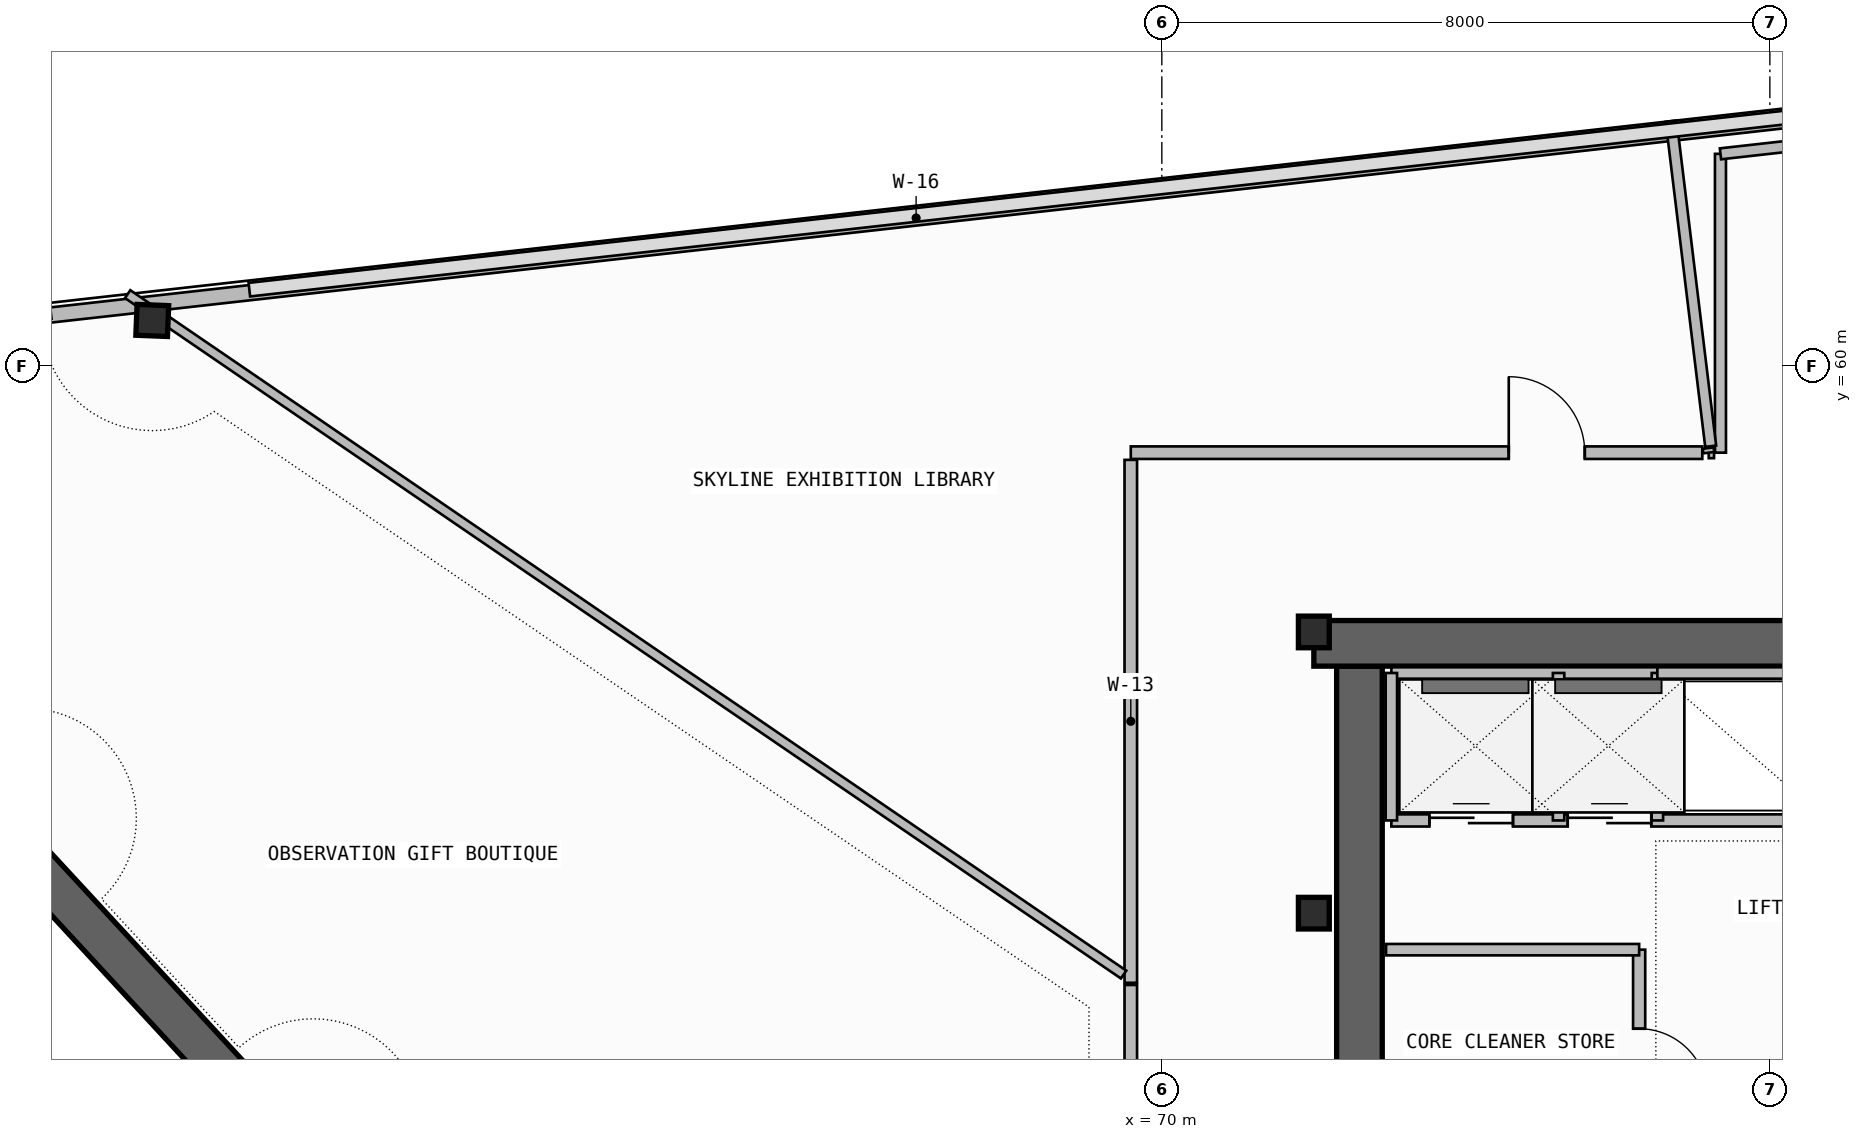
"""IFC4 building model, lengths in metres.
Left out: names, types, materials, properties, quantities, classifications, styles, units other than length and angle.
Written with IfcOpenShell. Run it as: python <this file> out.ifc"""

import sys

from ifc_helpers import new_model, si_unit, direction, frame, frame_2d, origin, origin_2d, place, context, subcontext, project, spatial, rectangle, i_section, extrude, element, fill, save


model = new_model("IFC4")
c1 = context("Model", 3, precision=1e-05, world=origin(), true_north=direction((0.0, 1.0)))
c2 = subcontext(c1, "Body", "Model", "MODEL_VIEW")
j1 = project(units=[si_unit("LENGTHUNIT", "METRE"), si_unit("PLANEANGLEUNIT", "RADIAN")], contexts=[c1])
p1 = place(None, origin())
s1 = spatial("IfcSite", under=j1, at=p1, CompositionType="ELEMENT")
p2 = place(p1, origin())
s2 = spatial("IfcBuilding", under=s1, at=p2, CompositionType="ELEMENT")
p3 = place(p2, frame((0.0, 0.0, 288.9)))
s3 = spatial("IfcBuildingStorey", under=s2, at=p3, CompositionType="ELEMENT", Elevation=288.9)
p4 = place(p3, frame((72.6, 43.35, -0.26), z_axis=(0.0, 0.0, 1.0), x_axis=(0.0, 1.0, 0.0)))
e1 = element("IfcWall", 1, at=p4, inside=s3, PredefinedType="SHEAR", context=c2, shape_type="SweptSolid", body=[
    extrude(rectangle(XDim=12.7, YDim=0.6, at=frame_2d((6.35, 0.0))), origin(), (0.0, 0.0, 1.0), 3.52),
])
p5 = place(p4, frame((1.35, 0.0, 0.26)))
e2 = element("IfcOpeningElement", 2, at=p5, cuts=e1, PredefinedType="OPENING", context=c2, shape_type="SweptSolid", body=[
    extrude(rectangle(XDim=1.2, YDim=2.2, at=frame_2d((0.6, 1.1))), frame((0.0, 0.31, 0.0), z_axis=(0.0, -1.0, 0.0), x_axis=(1.0, 0.0, 0.0)), (0.0, 0.0, 1.0), 0.62),
])
p6 = place(p3, frame((72.0, 56.35, -0.26), z_axis=(0.0, 0.0, 1.0), x_axis=(1.0, 0.0, 0.0)))
e3 = element("IfcWall", 3, at=p6, inside=s3, PredefinedType="SHEAR", context=c2, shape_type="SweptSolid", body=[
    extrude(rectangle(XDim=13.6, YDim=0.6, at=frame_2d((6.8, 0.0))), origin(), (0.0, 0.0, 1.0), 3.52),
])
for number, where, z_axis, x_axis in (
    (4, (72.0, 52.8, 0.0), (0.0, 0.0, 1.0), (1.0, 0.0, 0.0)),
    (5, (72.0, 56.5, 0.0), (0.0, 0.0, 1.0), (1.0, 0.0, 0.0)),
    (6, (56.717, 60.598, 0.0), (0.0, 0.0, 1.0), (0.039, 0.999, 0.0)),
):
    element("IfcColumn", number, at=place(p3, frame(where, z_axis=z_axis, x_axis=x_axis)), inside=s3, PredefinedType="COLUMN", context=c2, shape_type="SweptSolid", body=[
        extrude(i_section(OverallWidth=0.406, OverallDepth=0.416, WebThickness=0.03, FlangeThickness=0.048, FilletRadius=0.015, at=origin_2d()), origin(), (0.0, 0.0, 1.0), 3.52),
    ])
p7 = place(p3, frame((54.805, 53.812, -0.26), z_axis=(0.0, 0.0, 1.0), x_axis=(0.678803115619, -0.734320318543, 0.0)))
e7 = element("IfcWall", 7, at=p7, inside=s3, PredefinedType="SHEAR", context=c2, shape_type="SweptSolid", body=[
    extrude(rectangle(XDim=18.083, YDim=0.55, at=frame_2d((9.042, 0.0))), origin(), (0.0, 0.0, 1.0), 3.52),
])
p8 = place(p7, frame((7.434, 0.0, 1.1)))
e8 = element("IfcOpeningElement", 8, at=p8, cuts=e7, PredefinedType="OPENING", context=c2, shape_type="SweptSolid", body=[
    extrude(rectangle(XDim=2.4, YDim=1.2, at=frame_2d((1.2, 0.6))), frame((0.0, 0.285, 0.0), z_axis=(0.0, -1.0, 0.0), x_axis=(1.0, 0.0, 0.0)), (0.0, 0.0, 1.0), 0.57),
])
p9 = place(p3, frame((81.557, 63.604, 0.0), z_axis=(0.0, 0.0, 1.0), x_axis=(-0.993775831398, -0.111398370403, 0.0)))
e9 = element("IfcWall", 9, at=p9, inside=s3, PredefinedType="PARAPET", context=c2, shape_type="SweptSolid", body=[
    extrude(rectangle(XDim=29.764, YDim=0.2, at=frame_2d((14.882, 0.0))), origin(), (0.0, 0.0, 1.0), 1.15),
])
p10 = place(p3, frame((76.28, 47.18, 0.0), z_axis=(0.0, 0.0, 1.0), x_axis=(0.0, 1.0, 0.0)))
e10 = element("IfcWall", 10, at=p10, inside=s3, PredefinedType="SOLIDWALL", context=c2, shape_type="SweptSolid", body=[
    extrude(rectangle(XDim=5.14, YDim=0.16, at=frame_2d((2.57, 0.0))), origin(), (0.0, 0.0, 1.0), 3.26),
])
p11 = place(p10, frame((0.75, 0.0, 0.0)))
e11 = element("IfcOpeningElement", 11, at=p11, cuts=e10, PredefinedType="OPENING", context=c2, shape_type="SweptSolid", body=[
    extrude(rectangle(XDim=1.0, YDim=2.2, at=frame_2d((0.5, 1.1))), frame((0.0, 0.09, 0.0), z_axis=(0.0, -1.0, 0.0), x_axis=(1.0, 0.0, 0.0)), (0.0, 0.0, 1.0), 0.18),
])
p12 = place(p10, frame((3.2, 0.0, 0.0)))
e12 = element("IfcOpeningElement", 12, at=p12, cuts=e10, PredefinedType="OPENING", context=c2, shape_type="SweptSolid", body=[
    extrude(rectangle(XDim=0.9, YDim=2.1, at=frame_2d((0.45, 1.05))), frame((0.0, 0.09, 0.0), z_axis=(0.0, -1.0, 0.0), x_axis=(1.0, 0.0, 0.0)), (0.0, 0.0, 1.0), 0.18),
])
p13 = place(p3, frame((72.95, 52.32, 0.0), z_axis=(0.0, 0.0, 1.0), x_axis=(1.0, 0.0, 0.0)))
e13 = element("IfcWall", 13, at=p13, inside=s3, PredefinedType="SOLIDWALL", context=c2, shape_type="SweptSolid", body=[
    extrude(rectangle(XDim=3.33, YDim=0.15, at=frame_2d((1.665, 0.0))), origin(), (0.0, 0.0, 1.0), 3.26),
])
p14 = place(p3, frame((73.02, 54.02, 0.0), z_axis=(0.0, 0.0, 1.0), x_axis=(1.0, 0.0, 0.0)))
e14 = element("IfcWall", 14, at=p14, inside=s3, PredefinedType="SOLIDWALL", context=c2, shape_type="SweptSolid", body=[
    extrude(rectangle(XDim=12.08, YDim=0.16, at=frame_2d((6.04, 0.0))), origin(), (0.0, 0.0, 1.0), 3.26),
])
p15 = place(p14, frame((0.5, 0.0, 0.0)))
e15 = element("IfcOpeningElement", 15, at=p15, cuts=e14, PredefinedType="OPENING", context=c2, shape_type="SweptSolid", body=[
    extrude(rectangle(XDim=1.1, YDim=2.25, at=frame_2d((0.55, 1.125))), frame((0.0, 0.09, 0.0), z_axis=(0.0, -1.0, 0.0), x_axis=(1.0, 0.0, 0.0)), (0.0, 0.0, 1.0), 0.18),
])
p16 = place(p14, frame((2.32, 0.0, 0.0)))
e16 = element("IfcOpeningElement", 16, at=p16, cuts=e14, PredefinedType="OPENING", context=c2, shape_type="SweptSolid", body=[
    extrude(rectangle(XDim=1.1, YDim=2.25, at=frame_2d((0.55, 1.125))), frame((0.0, 0.09, 0.0), z_axis=(0.0, -1.0, 0.0), x_axis=(1.0, 0.0, 0.0)), (0.0, 0.0, 1.0), 0.18),
])
p17 = place(p3, frame((73.02, 55.96, 0.0), z_axis=(0.0, 0.0, 1.0), x_axis=(1.0, 0.0, 0.0)))
e17 = element("IfcWall", 17, at=p17, inside=s3, PredefinedType="SOLIDWALL", context=c2, shape_type="SweptSolid", body=[
    extrude(rectangle(XDim=3.5, YDim=0.15, at=frame_2d((1.75, 0.0))), origin(), (0.0, 0.0, 1.0), 3.26),
])
p18 = place(p3, frame((73.02, 54.02, 0.0), z_axis=(0.0, 0.0, 1.0), x_axis=(0.0, 1.0, 0.0)))
e18 = element("IfcWall", 18, at=p18, inside=s3, PredefinedType="PLUMBINGWALL", context=c2, shape_type="SweptSolid", body=[
    extrude(rectangle(XDim=1.94, YDim=0.15, at=frame_2d((0.97, 0.0))), origin(), (0.0, 0.0, 1.0), 3.26),
])
p19 = place(p3, frame((76.52, 54.02, 0.0), z_axis=(0.0, 0.0, 1.0), x_axis=(0.0, 1.0, 0.0)))
e19 = element("IfcWall", 19, at=p19, inside=s3, PredefinedType="SOLIDWALL", context=c2, shape_type="SweptSolid", body=[
    extrude(rectangle(XDim=1.94, YDim=0.15, at=frame_2d((0.97, 0.0))), origin(), (0.0, 0.0, 1.0), 3.26),
])
p20 = place(p3, frame((75.22, 54.02, 0.0), z_axis=(0.0, 0.0, 1.0), x_axis=(0.0, 1.0, 0.0)))
e20 = element("IfcWall", 20, at=p20, inside=s3, PredefinedType="PLUMBINGWALL", context=c2, shape_type="SweptSolid", body=[
    extrude(rectangle(XDim=1.94, YDim=0.15, at=frame_2d((0.97, 0.0))), origin(), (0.0, 0.0, 1.0), 3.26),
])
p21 = place(p3, frame((76.52, 55.96, 0.0), z_axis=(0.0, 0.0, 1.0), x_axis=(1.0, 0.0, 0.0)))
e21 = element("IfcWall", 21, at=p21, inside=s3, PredefinedType="SOLIDWALL", context=c2, shape_type="SweptSolid", body=[
    extrude(rectangle(XDim=6.7, YDim=0.15, at=frame_2d((3.35, 0.0))), origin(), (0.0, 0.0, 1.0), 3.26),
])
p22 = place(p3, frame((77.35, 62.79, 0.0), z_axis=(0.0, 0.0, 1.0), x_axis=(0.0, -1.0, 0.0)))
e22 = element("IfcWall", 22, at=p22, inside=s3, PredefinedType="PARTITIONING", context=c2, shape_type="SweptSolid", body=[
    extrude(rectangle(XDim=3.932, YDim=0.145, at=frame_2d((1.966, 0.0))), origin(), (0.0, 0.0, 1.0), 3.26),
])
p23 = place(p3, frame((79.565, 63.038, 0.0), z_axis=(0.0, 0.0, 1.0), x_axis=(-0.993777768559, -0.111381087792, 0.0)))
e23 = element("IfcWall", 23, at=p23, inside=s3, PredefinedType="PARTITIONING", context=c2, shape_type="SweptSolid", body=[
    extrude(rectangle(XDim=2.229, YDim=0.145, at=frame_2d((1.115, 0.0))), origin(), (0.0, 0.0, 1.0), 3.26),
])
p24 = place(p3, frame((77.265, 58.858, 0.0), z_axis=(0.0, 0.0, 1.0), x_axis=(-1.0, 0.0, 0.0)))
e24 = element("IfcWall", 24, at=p24, inside=s3, PredefinedType="PARTITIONING", context=c2, shape_type="SweptSolid", body=[
    extrude(rectangle(XDim=0.07, YDim=0.145, at=frame_2d((0.035, 0.0))), origin(), (0.0, 0.0, 1.0), 3.26),
])
p25 = place(p3, frame((77.196, 58.858, 0.0), z_axis=(0.0, 0.0, 1.0), x_axis=(-0.117075477944, 0.993123019804, 0.0)))
e25 = element("IfcWall", 25, at=p25, inside=s3, PredefinedType="PARTITIONING", context=c2, shape_type="SweptSolid", body=[
    extrude(rectangle(XDim=0.061, YDim=0.145, at=frame_2d((0.03, 0.0))), origin(), (0.0, 0.0, 1.0), 3.26),
])
p26 = place(p3, frame((77.221, 58.943, 0.0), z_axis=(0.0, 0.0, 1.0), x_axis=(-0.120735749013, 0.99268468252, 0.0)))
e26 = element("IfcWall", 26, at=p26, inside=s3, PredefinedType="PARTITIONING", context=c2, shape_type="SweptSolid", body=[
    extrude(rectangle(XDim=4.309, YDim=0.145, at=frame_2d((2.155, 0.0))), origin(), (0.0, 0.0, 1.0), 3.26),
])
p27 = place(p3, frame((77.111, 58.858, 0.0), z_axis=(0.0, 0.0, 1.0), x_axis=(-1.0, 0.0, 0.0)))
e27 = element("IfcWall", 27, at=p27, inside=s3, PredefinedType="PARTITIONING", context=c2, shape_type="SweptSolid", body=[
    extrude(rectangle(XDim=7.519, YDim=0.165, at=frame_2d((3.76, 0.0))), origin(), (0.0, 0.0, 1.0), 3.26),
])
p28 = place(p27, frame((1.546, 0.0, 0.0)))
e28 = element("IfcOpeningElement", 28, at=p28, cuts=e27, PredefinedType="OPENING", context=c2, shape_type="SweptSolid", body=[
    extrude(rectangle(XDim=1.0, YDim=2.2, at=frame_2d((0.5, 1.1))), frame((0.0, 0.093, 0.0), z_axis=(0.0, -1.0, 0.0), x_axis=(1.0, 0.0, 0.0)), (0.0, 0.0, 1.0), 0.185),
])
p29 = place(p3, frame((69.592, 58.764, 0.0), z_axis=(0.0, 0.0, 1.0), x_axis=(0.0, -1.0, 0.0)))
e29 = element("IfcWall", 29, at=p29, inside=s3, PredefinedType="PARTITIONING", context=c2, shape_type="SweptSolid", body=[
    extrude(rectangle(XDim=6.88, YDim=0.165, at=frame_2d((3.44, 0.0))), origin(), (0.0, 0.0, 1.0), 2.745),
])
p30 = place(p3, frame((69.497, 51.992, 0.0), z_axis=(0.0, 0.0, 1.0), x_axis=(-0.825720238729, 0.564079859021, 0.0)))
e30 = element("IfcWall", 30, at=p30, inside=s3, PredefinedType="PARTITIONING", context=c2, shape_type="SweptSolid", body=[
    extrude(rectangle(XDim=15.869, YDim=0.125, at=frame_2d((7.935, 0.0))), origin(), (0.0, 0.0, 1.0), 2.645),
])
p31 = place(p3, frame((69.592, 51.855, 0.0), z_axis=(0.0, 0.0, 1.0), x_axis=(0.0, -1.0, 0.0)))
e31 = element("IfcWall", 31, at=p31, inside=s3, PredefinedType="PARTITIONING", context=c2, shape_type="SweptSolid", body=[
    extrude(rectangle(XDim=4.304, YDim=0.165, at=frame_2d((2.152, 0.0))), origin(), (0.0, 0.0, 1.0), 2.745),
])
p32 = place(p31, frame((1.652, 0.0, 0.0)))
e32 = element("IfcOpeningElement", 32, at=p32, cuts=e31, PredefinedType="OPENING", context=c2, shape_type="SweptSolid", body=[
    extrude(rectangle(XDim=1.0, YDim=2.2, at=frame_2d((0.5, 1.1))), frame((0.0, 0.093, 0.0), z_axis=(0.0, -1.0, 0.0), x_axis=(1.0, 0.0, 0.0)), (0.0, 0.0, 1.0), 0.185),
])
p33 = place(p12, frame((0.9, 0.0, 0.0), z_axis=(0.0, 0.0, 1.0), x_axis=(-1.0, 0.0, 0.0)))
e33 = element("IfcDoor", 33, at=p33, inside=s3, OperationType="SINGLE_SWING_RIGHT", PredefinedType="DOOR", context=c2, shape_type="SweptSolid", body=[
    extrude(rectangle(XDim=0.9, YDim=2.1, at=frame_2d((0.45, 1.05))), frame((0.0, 0.025, 0.0), z_axis=(0.0, -1.0, 0.0), x_axis=(1.0, 0.0, 0.0)), (0.0, 0.0, 1.0), 0.05),
])
fill(e12, e33)
p34 = place(p15, origin())
e34 = element("IfcDoor", 34, at=p34, inside=s3, OperationType="DOUBLE_DOOR_SLIDING", PredefinedType="DOOR", context=c2, shape_type="SweptSolid", body=[
    extrude(rectangle(XDim=1.1, YDim=2.25, at=frame_2d((0.55, 1.125))), frame((0.0, 0.025, 0.0), z_axis=(0.0, -1.0, 0.0), x_axis=(1.0, 0.0, 0.0)), (0.0, 0.0, 1.0), 0.05),
])
fill(e15, e34)
p35 = place(p16, origin())
e35 = element("IfcDoor", 35, at=p35, inside=s3, OperationType="DOUBLE_DOOR_SLIDING", PredefinedType="DOOR", context=c2, shape_type="SweptSolid", body=[
    extrude(rectangle(XDim=1.1, YDim=2.25, at=frame_2d((0.55, 1.125))), frame((0.0, 0.025, 0.0), z_axis=(0.0, -1.0, 0.0), x_axis=(1.0, 0.0, 0.0)), (0.0, 0.0, 1.0), 0.05),
])
fill(e16, e35)
p36 = place(p28, frame((1.0, 0.0, 0.0), z_axis=(0.0, 0.0, 1.0), x_axis=(-1.0, 0.0, 0.0)))
e36 = element("IfcDoor", 36, at=p36, inside=s3, OperationType="SINGLE_SWING_LEFT", PredefinedType="DOOR", context=c2, shape_type="SweptSolid", body=[
    extrude(rectangle(XDim=1.0, YDim=2.2, at=frame_2d((0.5, 1.1))), frame((0.0, 0.025, 0.0), z_axis=(0.0, -1.0, 0.0), x_axis=(1.0, 0.0, 0.0)), (0.0, 0.0, 1.0), 0.05),
])
fill(e28, e36)
save(model, sys.argv[1])
